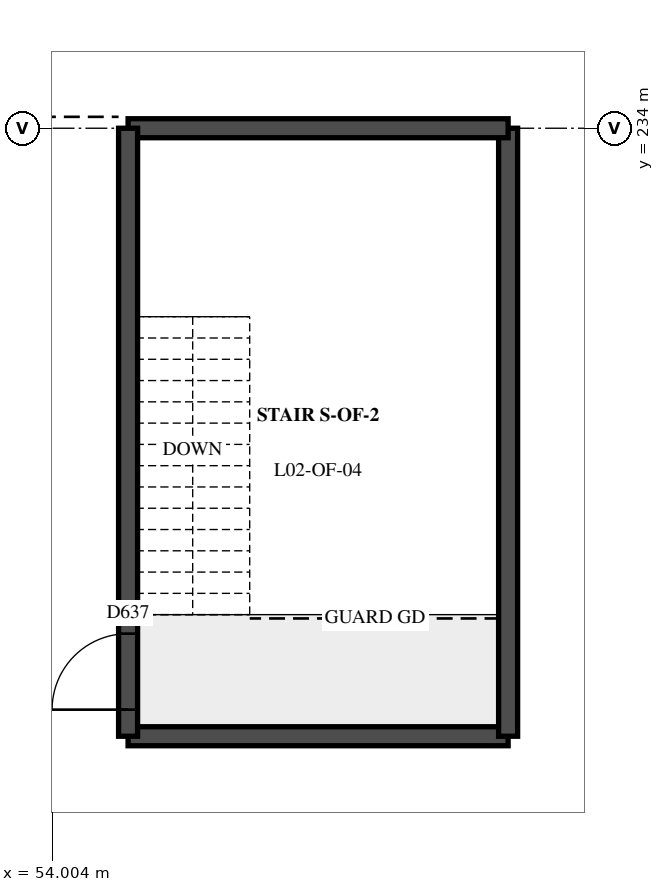
"""IFC4 building model, lengths in metres.
Left out: names, types, materials, properties, quantities, classifications, styles, units other than length and angle.
Written with IfcOpenShell. Run it as: python <this file> out.ifc"""

import sys

from ifc_helpers import new_model, si_unit, direction, frame, frame_2d, origin, place, context, subcontext, project, spatial, rectangle, extrude, element, fill, save


model = new_model("IFC4")
c1 = context("Model", 3, precision=1e-05, world=origin(), true_north=direction((0.0, 1.0)))
c2 = subcontext(c1, "Body", "Model", "MODEL_VIEW")
j1 = project(units=[si_unit("LENGTHUNIT", "METRE"), si_unit("PLANEANGLEUNIT", "RADIAN")], contexts=[c1])
p1 = place(None, origin())
s1 = spatial("IfcSite", under=j1, at=p1, CompositionType="ELEMENT")
p2 = place(p1, origin())
s2 = spatial("IfcBuilding", under=s1, at=p2, CompositionType="ELEMENT")
p3 = place(p2, frame((0.0, 0.0, 10.8)))
s3 = spatial("IfcBuildingStorey", under=s2, at=p3, CompositionType="ELEMENT", Elevation=10.8)
p4 = place(p3, frame((55.0, 226.0, 0.0), z_axis=(0.0, 0.0, 1.0), x_axis=(1.0, 0.0, 0.0)))
e1 = element("IfcWall", 1, at=p4, inside=s3, PredefinedType="SHEAR", context=c2, shape_type="SweptSolid", body=[
    extrude(rectangle(XDim=5.0, YDim=0.25, at=frame_2d((2.5, 0.0))), origin(), (0.0, 0.0, 1.0), 3.2),
])
p5 = place(p3, frame((60.0, 226.0, 0.0), z_axis=(0.0, 0.0, 1.0), x_axis=(0.0, 1.0, 0.0)))
e2 = element("IfcWall", 2, at=p5, inside=s3, PredefinedType="SHEAR", context=c2, shape_type="SweptSolid", body=[
    extrude(rectangle(XDim=8.0, YDim=0.25, at=frame_2d((4.0, 0.0))), origin(), (0.0, 0.0, 1.0), 3.2),
])
p6 = place(p3, frame((55.0, 234.0, 0.0), z_axis=(0.0, 0.0, 1.0), x_axis=(1.0, 0.0, 0.0)))
e3 = element("IfcWall", 3, at=p6, inside=s3, PredefinedType="SHEAR", context=c2, shape_type="SweptSolid", body=[
    extrude(rectangle(XDim=5.0, YDim=0.25, at=frame_2d((2.5, 0.0))), origin(), (0.0, 0.0, 1.0), 3.2),
])
p7 = place(p3, frame((55.0, 226.0, 0.0), z_axis=(0.0, 0.0, 1.0), x_axis=(0.0, 1.0, 0.0)))
e4 = element("IfcWall", 4, at=p7, inside=s3, PredefinedType="SHEAR", context=c2, shape_type="SweptSolid", body=[
    extrude(rectangle(XDim=8.0, YDim=0.25, at=frame_2d((4.0, 0.0))), origin(), (0.0, 0.0, 1.0), 3.2),
])
p8 = place(p7, frame((0.35, 0.0, 0.0)))
e5 = element("IfcOpeningElement", 5, at=p8, cuts=e4, PredefinedType="OPENING", context=c2, shape_type="SweptSolid", body=[
    extrude(rectangle(XDim=1.0, YDim=2.1, at=frame_2d((0.5, 1.05))), frame((0.0, 0.135, 0.0), z_axis=(0.0, -1.0, 0.0), x_axis=(1.0, 0.0, 0.0)), (0.0, 0.0, 1.0), 0.27),
])
p9 = place(p8, origin())
e6 = element("IfcDoor", 6, at=p9, inside=s3, OperationType="SINGLE_SWING_LEFT", PredefinedType="DOOR", context=c2, shape_type="SweptSolid", body=[
    extrude(rectangle(XDim=1.0, YDim=2.1, at=frame_2d((0.5, 1.05))), frame((0.0, 0.025, 0.0), z_axis=(0.0, -1.0, 0.0), x_axis=(1.0, 0.0, 0.0)), (0.0, 0.0, 1.0), 0.05),
])
fill(e5, e6)
save(model, sys.argv[1])
